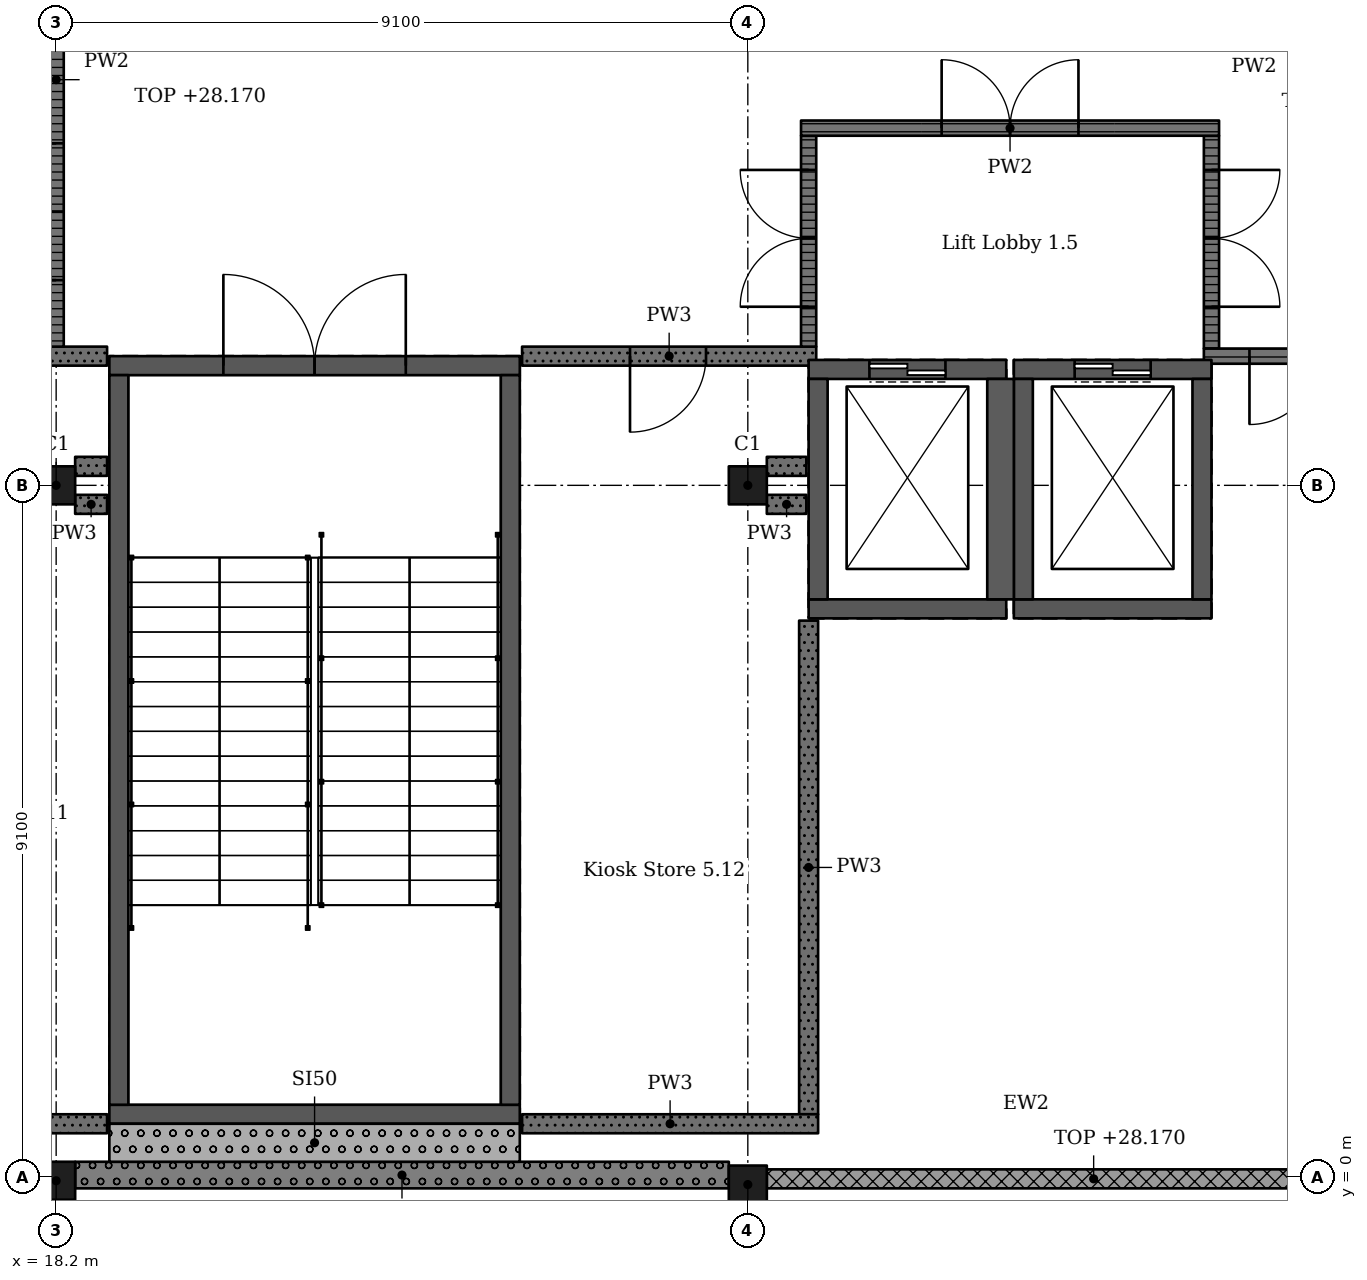
"""IFC4 building model, lengths in metres.
Left out: names, types, materials, properties, quantities, classifications, styles, units other than length and angle.
Written with IfcOpenShell. Run it as: python <this file> out.ifc"""

import sys

from ifc_helpers import new_model, si_unit, direction, frame, frame_2d, origin, origin_2d, place, context, subcontext, project, spatial, rectangle, extrude, element, fill, save


model = new_model("IFC4")
c1 = context("Model", 3, precision=1e-05, world=origin(), true_north=direction((0.0, 1.0)))
c2 = subcontext(c1, "Body", "Model", "MODEL_VIEW")
j1 = project(units=[si_unit("LENGTHUNIT", "METRE"), si_unit("PLANEANGLEUNIT", "RADIAN")], contexts=[c1])
p1 = place(None, origin())
s1 = spatial("IfcSite", under=j1, at=p1, CompositionType="ELEMENT")
p2 = place(p1, origin())
s2 = spatial("IfcBuilding", under=s1, at=p2, CompositionType="ELEMENT")
p3 = place(p2, frame((0.0, 0.0, 24.57)))
s3 = spatial("IfcBuildingStorey", under=s2, at=p3, CompositionType="ELEMENT", Elevation=24.57)
for number, where, z_axis, x_axis in (
    (1, (18.2, -0.05, 0.0), (0.0, 0.0, 1.0), (1.0, 0.0, 0.0)),
    (2, (18.2, 9.1, 0.0), (0.0, 0.0, 1.0), (1.0, 0.0, 0.0)),
    (3, (27.3, -0.1, 0.0), (0.0, 0.0, 1.0), (1.0, 0.0, 0.0)),
    (4, (27.3, 9.1, 0.0), (0.0, 0.0, 1.0), (1.0, 0.0, 0.0)),
):
    element("IfcColumn", number, at=place(p3, frame(where, z_axis=z_axis, x_axis=x_axis)), inside=s3, PredefinedType="COLUMN", context=c2, shape_type="SweptSolid", body=[
        extrude(rectangle(XDim=0.5, YDim=0.5, at=origin_2d()), origin(), (0.0, 0.0, 1.0), 4.55),
    ])
p4 = place(p3, frame((30.7, 7.475, 0.0), z_axis=(0.0, 0.0, 1.0), x_axis=(-1.0, 0.0, 0.0)))
e5 = element("IfcWall", 5, at=p4, inside=s3, PredefinedType="SHEAR", context=c2, shape_type="SweptSolid", body=[
    extrude(rectangle(XDim=2.6, YDim=0.25, at=frame_2d((1.3, 0.0))), origin(), (0.0, 0.0, 1.0), 4.55),
])
p5 = place(p3, frame((30.7, 10.625, 0.0), z_axis=(0.0, 0.0, 1.0), x_axis=(-1.0, 0.0, 0.0)))
e6 = element("IfcWall", 6, at=p5, inside=s3, PredefinedType="SHEAR", context=c2, shape_type="SweptSolid", body=[
    extrude(rectangle(XDim=2.6, YDim=0.25, at=frame_2d((1.3, 0.0))), origin(), (0.0, 0.0, 1.0), 4.55),
])
p6 = place(p5, frame((0.8, 0.0, 0.0)))
e7 = element("IfcOpeningElement", 7, at=p6, cuts=e6, PredefinedType="OPENING", context=c2, shape_type="SweptSolid", body=[
    extrude(rectangle(XDim=1.0, YDim=2.1, at=frame_2d((0.5, 1.05))), frame((0.0, 0.135, 0.0), z_axis=(0.0, -1.0, 0.0), x_axis=(1.0, 0.0, 0.0)), (0.0, 0.0, 1.0), 0.27),
])
p7 = place(p3, frame((28.225, 10.5, 0.0), z_axis=(0.0, 0.0, 1.0), x_axis=(0.0, -1.0, 0.0)))
e8 = element("IfcWall", 8, at=p7, inside=s3, PredefinedType="SHEAR", context=c2, shape_type="SweptSolid", body=[
    extrude(rectangle(XDim=2.9, YDim=0.25, at=frame_2d((1.45, 0.0))), origin(), (0.0, 0.0, 1.0), 4.55),
])
p8 = place(p3, frame((30.625, 10.5, 0.0), z_axis=(0.0, 0.0, 1.0), x_axis=(0.0, -1.0, 0.0)))
e9 = element("IfcWall", 9, at=p8, inside=s3, PredefinedType="SHEAR", context=c2, shape_type="SweptSolid", body=[
    extrude(rectangle(XDim=2.9, YDim=0.35, at=frame_2d((1.45, 0.0))), origin(), (0.0, 0.0, 1.0), 4.55),
])
p9 = place(p3, frame((33.4, 7.475, 0.0), z_axis=(0.0, 0.0, 1.0), x_axis=(-1.0, 0.0, 0.0)))
e10 = element("IfcWall", 10, at=p9, inside=s3, PredefinedType="SHEAR", context=c2, shape_type="SweptSolid", body=[
    extrude(rectangle(XDim=2.6, YDim=0.25, at=frame_2d((1.3, 0.0))), origin(), (0.0, 0.0, 1.0), 4.55),
])
p10 = place(p3, frame((33.4, 10.625, 0.0), z_axis=(0.0, 0.0, 1.0), x_axis=(-1.0, 0.0, 0.0)))
e11 = element("IfcWall", 11, at=p10, inside=s3, PredefinedType="SHEAR", context=c2, shape_type="SweptSolid", body=[
    extrude(rectangle(XDim=2.6, YDim=0.25, at=frame_2d((1.3, 0.0))), origin(), (0.0, 0.0, 1.0), 4.55),
])
p11 = place(p10, frame((0.8, 0.0, 0.0)))
e12 = element("IfcOpeningElement", 12, at=p11, cuts=e11, PredefinedType="OPENING", context=c2, shape_type="SweptSolid", body=[
    extrude(rectangle(XDim=1.0, YDim=2.1, at=frame_2d((0.5, 1.05))), frame((0.0, 0.135, 0.0), z_axis=(0.0, -1.0, 0.0), x_axis=(1.0, 0.0, 0.0)), (0.0, 0.0, 1.0), 0.27),
])
for number, where, z_axis, x_axis in (
    (13, (30.925, 10.5, 0.0), (0.0, 0.0, 1.0), (0.0, -1.0, 0.0)),
    (14, (33.275, 10.5, 0.0), (0.0, 0.0, 1.0), (0.0, -1.0, 0.0)),
):
    element("IfcWall", number, at=place(p3, frame(where, z_axis=z_axis, x_axis=x_axis)), inside=s3, PredefinedType="SHEAR", context=c2, shape_type="SweptSolid", body=[
        extrude(rectangle(XDim=2.9, YDim=0.25, at=frame_2d((1.45, 0.0))), origin(), (0.0, 0.0, 1.0), 4.55),
    ])
p12 = place(p3, frame((24.3, 0.825, 0.0), z_axis=(0.0, 0.0, 1.0), x_axis=(-1.0, 0.0, 0.0)))
e15 = element("IfcWall", 15, at=p12, inside=s3, PredefinedType="SHEAR", context=c2, shape_type="SweptSolid", body=[
    extrude(rectangle(XDim=5.4, YDim=0.25, at=frame_2d((2.7, 0.0))), origin(), (0.0, 0.0, 1.0), 4.55),
])
p13 = place(p3, frame((24.3, 10.675, 0.0), z_axis=(0.0, 0.0, 1.0), x_axis=(-1.0, 0.0, 0.0)))
e16 = element("IfcWall", 16, at=p13, inside=s3, PredefinedType="SHEAR", context=c2, shape_type="SweptSolid", body=[
    extrude(rectangle(XDim=5.4, YDim=0.25, at=frame_2d((2.7, 0.0))), origin(), (0.0, 0.0, 1.0), 4.55),
])
p14 = place(p13, frame((1.5, 0.0, 0.0)))
e17 = element("IfcOpeningElement", 17, at=p14, cuts=e16, PredefinedType="OPENING", context=c2, shape_type="SweptSolid", body=[
    extrude(rectangle(XDim=2.4, YDim=2.1, at=frame_2d((1.2, 1.05))), frame((0.0, 0.135, 0.0), z_axis=(0.0, -1.0, 0.0), x_axis=(1.0, 0.0, 0.0)), (0.0, 0.0, 1.0), 0.27),
])
for number, where, z_axis, x_axis in (
    (18, (19.025, 10.55, 0.0), (0.0, 0.0, 1.0), (0.0, -1.0, 0.0)),
    (19, (24.175, 10.55, 0.0), (0.0, 0.0, 1.0), (0.0, -1.0, 0.0)),
):
    element("IfcWall", number, at=place(p3, frame(where, z_axis=z_axis, x_axis=x_axis)), inside=s3, PredefinedType="SHEAR", context=c2, shape_type="SweptSolid", body=[
        extrude(rectangle(XDim=9.6, YDim=0.25, at=frame_2d((4.8, 0.0))), origin(), (0.0, 0.0, 1.0), 4.55),
    ])
p15 = place(p3, frame((18.45, 0.025, 0.0), z_axis=(0.0, 0.0, 1.0), x_axis=(1.0, 0.0, 0.0)))
e20 = element("IfcWall", 20, at=p15, inside=s3, PredefinedType="SOLIDWALL", context=c2, shape_type="SweptSolid", body=[
    extrude(rectangle(XDim=8.6, YDim=0.35, at=frame_2d((4.3, 0.0))), origin(), (0.0, 0.0, 1.0), 3.6),
])
p16 = place(p3, frame((27.55, -0.025, 0.0), z_axis=(0.0, 0.0, 1.0), x_axis=(1.0, 0.0, 0.0)))
e21 = element("IfcWall", 21, at=p16, inside=s3, PredefinedType="SOLIDWALL", context=c2, shape_type="SweptSolid", body=[
    extrude(rectangle(XDim=8.6, YDim=0.25, at=frame_2d((4.3, 0.0))), origin(), (0.0, 0.0, 1.0), 3.6),
])
p17 = place(p3, frame((18.9, 0.45, 0.0), z_axis=(0.0, 0.0, 1.0), x_axis=(1.0, 0.0, 0.0)))
e22 = element("IfcWall", 22, at=p17, inside=s3, PredefinedType="SOLIDWALL", context=c2, shape_type="SweptSolid", body=[
    extrude(rectangle(XDim=5.4, YDim=0.5, at=frame_2d((2.7, 0.0))), origin(), (0.0, 0.0, 1.0), 4.35),
])
p18 = place(p3, frame((15.23, 10.8, 0.0), z_axis=(0.0, 0.0, 1.0), x_axis=(1.0, 0.0, 0.0)))
e23 = element("IfcWall", 23, at=p18, inside=s3, PredefinedType="SOLIDWALL", context=c2, shape_type="SweptSolid", body=[
    extrude(rectangle(XDim=3.64, YDim=0.25, at=frame_2d((1.82, 0.0))), origin(), (0.0, 0.0, 1.0), 4.35),
])
p19 = place(p18, frame((1.12, 0.0, 0.0)))
e24 = element("IfcOpeningElement", 24, at=p19, cuts=e23, PredefinedType="OPENING", context=c2, shape_type="SweptSolid", body=[
    extrude(rectangle(XDim=0.8, YDim=2.1, at=frame_2d((0.4, 1.05))), frame((0.0, 0.135, 0.0), z_axis=(0.0, -1.0, 0.0), x_axis=(1.0, 0.0, 0.0)), (0.0, 0.0, 1.0), 0.27),
])
p20 = place(p3, frame((18.2, 17.95, 0.0), z_axis=(0.0, 0.0, 1.0), x_axis=(0.0, -1.0, 0.0)))
e25 = element("IfcWall", 25, at=p20, inside=s3, PredefinedType="PARTITIONING", context=c2, shape_type="SweptSolid", body=[
    extrude(rectangle(XDim=7.025, YDim=0.2, at=frame_2d((3.512, 0.0))), origin(), (0.0, 0.0, 1.0), 3.6),
])
p21 = place(p20, frame((0.85, 0.0, 0.0)))
e26 = element("IfcOpeningElement", 26, at=p21, cuts=e25, PredefinedType="OPENING", context=c2, shape_type="SweptSolid", body=[
    extrude(rectangle(XDim=1.8, YDim=2.4, at=frame_2d((0.9, 1.2))), frame((0.0, 0.11, 0.0), z_axis=(0.0, -1.0, 0.0), x_axis=(1.0, 0.0, 0.0)), (0.0, 0.0, 1.0), 0.22),
])
p22 = place(p20, frame((4.35, 0.0, 0.0)))
e27 = element("IfcOpeningElement", 27, at=p22, cuts=e25, PredefinedType="OPENING", context=c2, shape_type="SweptSolid", body=[
    extrude(rectangle(XDim=1.8, YDim=2.4, at=frame_2d((0.9, 1.2))), frame((0.0, 0.11, 0.0), z_axis=(0.0, -1.0, 0.0), x_axis=(1.0, 0.0, 0.0)), (0.0, 0.0, 1.0), 0.22),
])
p23 = place(p3, frame((18.45, 8.85, 0.0), z_axis=(0.0, 0.0, 1.0), x_axis=(1.0, 0.0, 0.0)))
e28 = element("IfcWall", 28, at=p23, inside=s3, PredefinedType="SOLIDWALL", context=c2, shape_type="SweptSolid", body=[
    extrude(rectangle(XDim=0.42, YDim=0.25, at=frame_2d((0.21, 0.0))), origin(), (0.0, 0.0, 1.0), 4.35),
])
p24 = place(p3, frame((18.87, 0.7, 0.0), z_axis=(0.0, 0.0, 1.0), x_axis=(-1.0, 0.0, 0.0)))
e29 = element("IfcWall", 29, at=p24, inside=s3, PredefinedType="SOLIDWALL", context=c2, shape_type="SweptSolid", body=[
    extrude(rectangle(XDim=3.64, YDim=0.25, at=frame_2d((1.82, 0.0))), origin(), (0.0, 0.0, 1.0), 4.35),
])
p25 = place(p3, frame((18.87, 9.35, 0.0), z_axis=(0.0, 0.0, 1.0), x_axis=(-1.0, 0.0, 0.0)))
e30 = element("IfcWall", 30, at=p25, inside=s3, PredefinedType="SOLIDWALL", context=c2, shape_type="SweptSolid", body=[
    extrude(rectangle(XDim=0.42, YDim=0.25, at=frame_2d((0.21, 0.0))), origin(), (0.0, 0.0, 1.0), 4.35),
])
for number, where, z_axis, x_axis in (
    (31, (27.55, 8.85, 0.0), (0.0, 0.0, 1.0), (1.0, 0.0, 0.0)),
    (32, (28.07, 9.35, 0.0), (0.0, 0.0, 1.0), (-1.0, 0.0, 0.0)),
):
    element("IfcWall", number, at=place(p3, frame(where, z_axis=z_axis, x_axis=x_axis)), inside=s3, PredefinedType="SOLIDWALL", context=c2, shape_type="SweptSolid", body=[
        extrude(rectangle(XDim=0.52, YDim=0.25, at=frame_2d((0.26, 0.0))), origin(), (0.0, 0.0, 1.0), 4.35),
    ])
p26 = place(p3, frame((28.1, 7.32, 0.0), z_axis=(0.0, 0.0, 1.0), x_axis=(0.0, -1.0, 0.0)))
e33 = element("IfcWall", 33, at=p26, inside=s3, PredefinedType="SOLIDWALL", context=c2, shape_type="SweptSolid", body=[
    extrude(rectangle(XDim=6.495, YDim=0.25, at=frame_2d((3.248, 0.0))), origin(), (0.0, 0.0, 1.0), 4.35),
])
p27 = place(p3, frame((28.1, 13.7, 0.0), z_axis=(0.0, 0.0, 1.0), x_axis=(0.0, -1.0, 0.0)))
e34 = element("IfcWall", 34, at=p27, inside=s3, PredefinedType="PARTITIONING", context=c2, shape_type="SweptSolid", body=[
    extrude(rectangle(XDim=2.775, YDim=0.2, at=frame_2d((1.387, 0.0))), origin(), (0.0, 0.0, 1.0), 4.35),
])
p28 = place(p27, frame((0.45, 0.0, 0.0)))
e35 = element("IfcOpeningElement", 35, at=p28, cuts=e34, PredefinedType="OPENING", context=c2, shape_type="SweptSolid", body=[
    extrude(rectangle(XDim=1.8, YDim=2.4, at=frame_2d((0.9, 1.2))), frame((0.0, 0.11, 0.0), z_axis=(0.0, -1.0, 0.0), x_axis=(1.0, 0.0, 0.0)), (0.0, 0.0, 1.0), 0.22),
])
p29 = place(p3, frame((28.2, 10.8, 0.0), z_axis=(0.0, 0.0, 1.0), x_axis=(-1.0, 0.0, 0.0)))
e36 = element("IfcWall", 36, at=p29, inside=s3, PredefinedType="SOLIDWALL", context=c2, shape_type="SweptSolid", body=[
    extrude(rectangle(XDim=3.87, YDim=0.25, at=frame_2d((1.935, 0.0))), origin(), (0.0, 0.0, 1.0), 4.35),
])
p30 = place(p29, frame((1.45, 0.0, 0.0)))
e37 = element("IfcOpeningElement", 37, at=p30, cuts=e36, PredefinedType="OPENING", context=c2, shape_type="SweptSolid", body=[
    extrude(rectangle(XDim=1.0, YDim=2.1, at=frame_2d((0.5, 1.05))), frame((0.0, 0.135, 0.0), z_axis=(0.0, -1.0, 0.0), x_axis=(1.0, 0.0, 0.0)), (0.0, 0.0, 1.0), 0.27),
])
p31 = place(p3, frame((28.225, 0.7, 0.0), z_axis=(0.0, 0.0, 1.0), x_axis=(-1.0, 0.0, 0.0)))
e38 = element("IfcWall", 38, at=p31, inside=s3, PredefinedType="SOLIDWALL", context=c2, shape_type="SweptSolid", body=[
    extrude(rectangle(XDim=3.895, YDim=0.25, at=frame_2d((1.948, 0.0))), origin(), (0.0, 0.0, 1.0), 4.35),
])
p32 = place(p3, frame((33.4, 10.9, 0.0), z_axis=(0.0, 0.0, 1.0), x_axis=(0.0, 1.0, 0.0)))
e39 = element("IfcWall", 39, at=p32, inside=s3, PredefinedType="PARTITIONING", context=c2, shape_type="SweptSolid", body=[
    extrude(rectangle(XDim=2.8, YDim=0.2, at=frame_2d((1.4, 0.0))), origin(), (0.0, 0.0, 1.0), 4.35),
])
p33 = place(p32, frame((0.55, 0.0, 0.0)))
e40 = element("IfcOpeningElement", 40, at=p33, cuts=e39, PredefinedType="OPENING", context=c2, shape_type="SweptSolid", body=[
    extrude(rectangle(XDim=1.8, YDim=2.4, at=frame_2d((0.9, 1.2))), frame((0.0, 0.11, 0.0), z_axis=(0.0, -1.0, 0.0), x_axis=(1.0, 0.0, 0.0)), (0.0, 0.0, 1.0), 0.22),
])
p34 = place(p3, frame((33.5, 13.8, 0.0), z_axis=(0.0, 0.0, 1.0), x_axis=(-1.0, 0.0, 0.0)))
e41 = element("IfcWall", 41, at=p34, inside=s3, PredefinedType="PARTITIONING", context=c2, shape_type="SweptSolid", body=[
    extrude(rectangle(XDim=5.5, YDim=0.2, at=frame_2d((2.75, 0.0))), origin(), (0.0, 0.0, 1.0), 4.35),
])
p35 = place(p34, frame((1.85, 0.0, 0.0)))
e42 = element("IfcOpeningElement", 42, at=p35, cuts=e41, PredefinedType="OPENING", context=c2, shape_type="SweptSolid", body=[
    extrude(rectangle(XDim=1.8, YDim=2.4, at=frame_2d((0.9, 1.2))), frame((0.0, 0.11, 0.0), z_axis=(0.0, -1.0, 0.0), x_axis=(1.0, 0.0, 0.0)), (0.0, 0.0, 1.0), 0.22),
])
p36 = place(p3, frame((36.25, 10.8, 0.0), z_axis=(0.0, 0.0, 1.0), x_axis=(-1.0, 0.0, 0.0)))
e43 = element("IfcWall", 43, at=p36, inside=s3, PredefinedType="PARTITIONING", context=c2, shape_type="SweptSolid", body=[
    extrude(rectangle(XDim=2.95, YDim=0.2, at=frame_2d((1.475, 0.0))), origin(), (0.0, 0.0, 1.0), 4.35),
])
p37 = place(p36, frame((0.55, 0.0, 0.0)))
e44 = element("IfcOpeningElement", 44, at=p37, cuts=e43, PredefinedType="OPENING", context=c2, shape_type="SweptSolid", body=[
    extrude(rectangle(XDim=1.8, YDim=2.4, at=frame_2d((0.9, 1.2))), frame((0.0, 0.11, 0.0), z_axis=(0.0, -1.0, 0.0), x_axis=(1.0, 0.0, 0.0)), (0.0, 0.0, 1.0), 0.22),
])
p38 = place(p30, origin())
e45 = element("IfcDoor", 45, at=p38, inside=s3, OperationType="SINGLE_SWING_LEFT", PredefinedType="DOOR", context=c2, shape_type="SweptSolid", body=[
    extrude(rectangle(XDim=1.0, YDim=2.1, at=frame_2d((0.5, 1.05))), frame((0.0, 0.025, 0.0), z_axis=(0.0, -1.0, 0.0), x_axis=(1.0, 0.0, 0.0)), (0.0, 0.0, 1.0), 0.05),
])
fill(e37, e45)
p39 = place(p22, origin())
e46 = element("IfcDoor", 46, at=p39, inside=s3, OperationType="DOUBLE_DOOR_SINGLE_SWING", PredefinedType="DOOR", context=c2, shape_type="SweptSolid", body=[
    extrude(rectangle(XDim=1.8, YDim=2.4, at=frame_2d((0.9, 1.2))), frame((0.0, 0.025, 0.0), z_axis=(0.0, -1.0, 0.0), x_axis=(1.0, 0.0, 0.0)), (0.0, 0.0, 1.0), 0.05),
])
fill(e27, e46)
p40 = place(p35, origin())
e47 = element("IfcDoor", 47, at=p40, inside=s3, OperationType="DOUBLE_DOOR_SINGLE_SWING", PredefinedType="DOOR", context=c2, shape_type="SweptSolid", body=[
    extrude(rectangle(XDim=1.8, YDim=2.4, at=frame_2d((0.9, 1.2))), frame((0.0, 0.025, 0.0), z_axis=(0.0, -1.0, 0.0), x_axis=(1.0, 0.0, 0.0)), (0.0, 0.0, 1.0), 0.05),
])
fill(e42, e47)
p41 = place(p33, origin())
e48 = element("IfcDoor", 48, at=p41, inside=s3, OperationType="DOUBLE_DOOR_SINGLE_SWING", PredefinedType="DOOR", context=c2, shape_type="SweptSolid", body=[
    extrude(rectangle(XDim=1.8, YDim=2.4, at=frame_2d((0.9, 1.2))), frame((0.0, 0.025, 0.0), z_axis=(0.0, -1.0, 0.0), x_axis=(1.0, 0.0, 0.0)), (0.0, 0.0, 1.0), 0.05),
])
fill(e40, e48)
p42 = place(p28, origin())
e49 = element("IfcDoor", 49, at=p42, inside=s3, OperationType="DOUBLE_DOOR_SINGLE_SWING", PredefinedType="DOOR", context=c2, shape_type="SweptSolid", body=[
    extrude(rectangle(XDim=1.8, YDim=2.4, at=frame_2d((0.9, 1.2))), frame((0.0, 0.025, 0.0), z_axis=(0.0, -1.0, 0.0), x_axis=(1.0, 0.0, 0.0)), (0.0, 0.0, 1.0), 0.05),
])
fill(e35, e49)
p43 = place(p37, origin())
e50 = element("IfcDoor", 50, at=p43, inside=s3, OperationType="DOUBLE_DOOR_SINGLE_SWING", PredefinedType="DOOR", context=c2, shape_type="SweptSolid", body=[
    extrude(rectangle(XDim=1.8, YDim=2.4, at=frame_2d((0.9, 1.2))), frame((0.0, 0.025, 0.0), z_axis=(0.0, -1.0, 0.0), x_axis=(1.0, 0.0, 0.0)), (0.0, 0.0, 1.0), 0.05),
])
fill(e44, e50)
p44 = place(p14, origin())
e51 = element("IfcDoor", 51, at=p44, inside=s3, OperationType="DOUBLE_DOOR_SINGLE_SWING", PredefinedType="DOOR", context=c2, shape_type="SweptSolid", body=[
    extrude(rectangle(XDim=2.4, YDim=2.1, at=frame_2d((1.2, 1.05))), frame((0.0, 0.025, 0.0), z_axis=(0.0, -1.0, 0.0), x_axis=(1.0, 0.0, 0.0)), (0.0, 0.0, 1.0), 0.05),
])
fill(e17, e51)
p45 = place(p6, origin())
e52 = element("IfcDoor", 52, at=p45, inside=s3, OperationType="DOUBLE_DOOR_SLIDING", PredefinedType="DOOR", context=c2, shape_type="SweptSolid", body=[
    extrude(rectangle(XDim=1.0, YDim=2.1, at=frame_2d((0.5, 1.05))), frame((0.0, 0.025, 0.0), z_axis=(0.0, -1.0, 0.0), x_axis=(1.0, 0.0, 0.0)), (0.0, 0.0, 1.0), 0.05),
])
fill(e7, e52)
p46 = place(p11, origin())
e53 = element("IfcDoor", 53, at=p46, inside=s3, OperationType="DOUBLE_DOOR_SLIDING", PredefinedType="DOOR", context=c2, shape_type="SweptSolid", body=[
    extrude(rectangle(XDim=1.0, YDim=2.1, at=frame_2d((0.5, 1.05))), frame((0.0, 0.025, 0.0), z_axis=(0.0, -1.0, 0.0), x_axis=(1.0, 0.0, 0.0)), (0.0, 0.0, 1.0), 0.05),
])
fill(e12, e53)
save(model, sys.argv[1])
